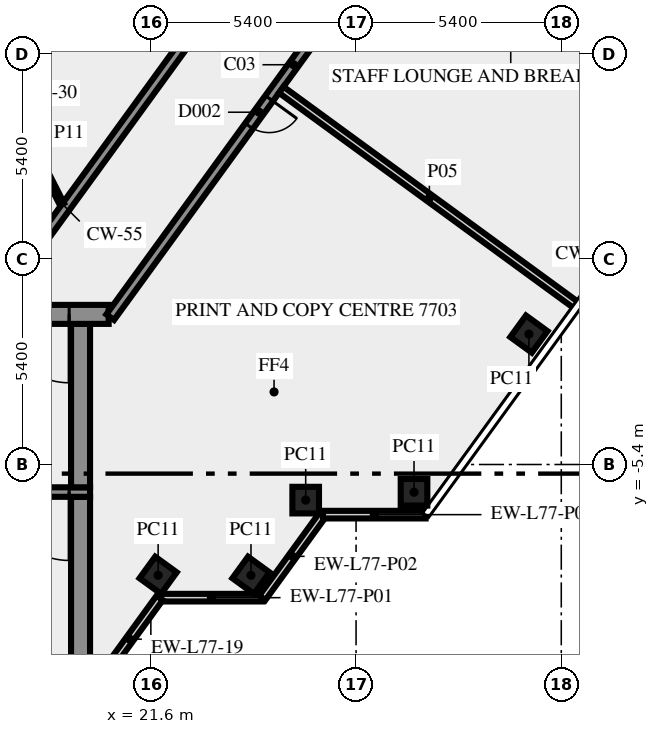
"""IFC4 building model, lengths in metres.
Left out: names, types, materials, properties, quantities, classifications, styles, units other than length and angle.
Written with IfcOpenShell. Run it as: python <this file> out.ifc"""

import sys

from ifc_helpers import new_model, si_unit, direction, frame, frame_2d, origin, origin_2d, place, context, subcontext, project, spatial, rectangle, extrude, element, fill, save


model = new_model("IFC4")
c1 = context("Model", 3, precision=1e-05, world=origin(), true_north=direction((0.0, 1.0)))
c2 = subcontext(c1, "Body", "Model", "MODEL_VIEW")
j1 = project(units=[si_unit("LENGTHUNIT", "METRE"), si_unit("PLANEANGLEUNIT", "RADIAN")], contexts=[c1])
p1 = place(None, origin())
s1 = spatial("IfcSite", under=j1, at=p1, CompositionType="ELEMENT")
p2 = place(p1, origin())
s2 = spatial("IfcBuilding", under=s1, at=p2, CompositionType="ELEMENT")
p3 = place(p2, frame((0.0, 0.0, 331.0)))
s3 = spatial("IfcBuildingStorey", under=s2, at=p3, CompositionType="ELEMENT", Elevation=331.0)
for number, where, z_axis, x_axis in (
    (1, (21.792, -8.315, 0.0), (0.0, 0.0, 1.0), (0.588, 0.809, 0.0)),
    (2, (24.235, -8.315, 0.0), (0.0, 0.0, 1.0), (0.588, 0.809, 0.0)),
    (3, (25.674, -6.337, 0.0), (0.0, 0.0, 1.0), (1.0, 0.0, 0.0)),
    (4, (28.525, -6.13, 0.0), (0.0, 0.0, 1.0), (1.0, 0.0, 0.0)),
    (5, (31.548, -1.969, 0.0), (0.0, 0.0, 1.0), (0.588, 0.809, 0.0)),
):
    element("IfcColumn", number, at=place(p3, frame(where, z_axis=z_axis, x_axis=x_axis)), inside=s3, PredefinedType="COLUMN", context=c2, shape_type="SweptSolid", body=[
        extrude(rectangle(XDim=0.7, YDim=0.7, at=origin_2d()), origin(), (0.0, 0.0, 1.0), 3.65),
    ])
p4 = place(p3, frame((21.843, -8.904, 0.0), z_axis=(0.0, 0.0, 1.0), x_axis=(1.0, 0.0, 0.0)))
e6 = element("IfcWall", 6, at=p4, inside=s3, PredefinedType="SOLIDWALL", context=c2, shape_type="SweptSolid", body=[
    extrude(rectangle(XDim=2.7, YDim=0.2, at=frame_2d((1.35, 0.0))), origin(), (0.0, 0.0, 1.0), 3.65),
])
p5 = place(p3, frame((24.533, -8.909, 0.0), z_axis=(0.0, 0.0, 1.0), x_axis=(0.587720002413, 0.809064397168, 0.0)))
e7 = element("IfcWall", 7, at=p5, inside=s3, PredefinedType="SOLIDWALL", context=c2, shape_type="SweptSolid", body=[
    extrude(rectangle(XDim=2.7, YDim=0.2, at=frame_2d((1.35, 0.0))), origin(), (0.0, 0.0, 1.0), 3.65),
])
p6 = place(p3, frame((26.13, -6.719, 0.0), z_axis=(0.0, 0.0, 1.0), x_axis=(1.0, 0.0, 0.0)))
e8 = element("IfcWall", 8, at=p6, inside=s3, PredefinedType="SOLIDWALL", context=c2, shape_type="SweptSolid", body=[
    extrude(rectangle(XDim=2.7, YDim=0.2, at=frame_2d((1.35, 0.0))), origin(), (0.0, 0.0, 1.0), 3.65),
])
p7 = place(p3, frame((20.253, -11.083, 0.0), z_axis=(0.0, 0.0, 1.0), x_axis=(0.587766567315, 0.809030569476, 0.0)))
e9 = element("IfcWall", 9, at=p7, inside=s3, PredefinedType="SOLIDWALL", context=c2, shape_type="SweptSolid", body=[
    extrude(rectangle(XDim=2.688, YDim=0.2, at=frame_2d((1.344, 0.0))), origin(), (0.0, 0.0, 1.0), 3.65),
])
p8 = place(p3, frame((19.75, -10.5, 0.0), z_axis=(0.0, 0.0, 1.0), x_axis=(0.0, 1.0, 0.0)))
e10 = element("IfcWall", 10, at=p8, inside=s3, PredefinedType="SHEAR", context=c2, shape_type="SweptSolid", body=[
    extrude(rectangle(XDim=4.25, YDim=0.5, at=frame_2d((2.125, 0.0))), origin(), (0.0, 0.0, 1.0), 3.65),
])
p9 = place(p3, frame((20.0, -6.125, 0.0), z_axis=(0.0, 0.0, 1.0), x_axis=(-1.0, 0.0, 0.0)))
e11 = element("IfcWall", 11, at=p9, inside=s3, PredefinedType="SHEAR", context=c2, shape_type="SweptSolid", body=[
    extrude(rectangle(XDim=10.8, YDim=0.25, at=frame_2d((5.4, 0.0))), origin(), (0.0, 0.0, 1.0), 3.65),
])
p10 = place(p9, frame((0.55, 0.0, 0.0)))
e12 = element("IfcOpeningElement", 12, at=p10, cuts=e11, PredefinedType="OPENING", context=c2, shape_type="SweptSolid", body=[
    extrude(rectangle(XDim=1.8, YDim=2.1, at=frame_2d((0.9, 1.05))), frame((0.0, 0.135, 0.0), z_axis=(0.0, -1.0, 0.0), x_axis=(1.0, 0.0, 0.0)), (0.0, 0.0, 1.0), 0.27),
])
p11 = place(p3, frame((19.75, -6.0, 0.0), z_axis=(0.0, 0.0, 1.0), x_axis=(0.0, 1.0, 0.0)))
e13 = element("IfcWall", 13, at=p11, inside=s3, PredefinedType="SHEAR", context=c2, shape_type="SweptSolid", body=[
    extrude(rectangle(XDim=4.3, YDim=0.5, at=frame_2d((2.15, 0.0))), origin(), (0.0, 0.0, 1.0), 3.65),
])
p12 = place(p3, frame((20.49, -1.45, 0.0), z_axis=(0.0, 0.0, 1.0), x_axis=(-1.0, 0.0, 0.0)))
e14 = element("IfcWall", 14, at=p12, inside=s3, PredefinedType="SHEAR", context=c2, shape_type="SweptSolid", body=[
    extrude(rectangle(XDim=40.98, YDim=0.5, at=frame_2d((20.49, 0.0))), origin(), (0.0, 0.0, 1.0), 3.65),
])
p13 = place(p12, frame((38.14, 0.0, 0.0)))
e15 = element("IfcOpeningElement", 15, at=p13, cuts=e14, PredefinedType="OPENING", context=c2, shape_type="SweptSolid", body=[
    extrude(rectangle(XDim=1.8, YDim=2.1, at=frame_2d((0.9, 1.05))), frame((0.0, 0.26, 0.0), z_axis=(0.0, -1.0, 0.0), x_axis=(1.0, 0.0, 0.0)), (0.0, 0.0, 1.0), 0.52),
])
p14 = place(p12, frame((36.728, 0.0, 0.0)))
e16 = element("IfcOpeningElement", 16, at=p14, cuts=e14, PredefinedType="OPENING", context=c2, shape_type="SweptSolid", body=[
    extrude(rectangle(XDim=0.8, YDim=2.1, at=frame_2d((0.4, 1.05))), frame((0.0, 0.26, 0.0), z_axis=(0.0, -1.0, 0.0), x_axis=(1.0, 0.0, 0.0)), (0.0, 0.0, 1.0), 0.52),
])
p15 = place(p12, frame((35.153, 0.0, 0.0)))
e17 = element("IfcOpeningElement", 17, at=p15, cuts=e14, PredefinedType="OPENING", context=c2, shape_type="SweptSolid", body=[
    extrude(rectangle(XDim=0.8, YDim=2.1, at=frame_2d((0.4, 1.05))), frame((0.0, 0.26, 0.0), z_axis=(0.0, -1.0, 0.0), x_axis=(1.0, 0.0, 0.0)), (0.0, 0.0, 1.0), 0.52),
])
p16 = place(p12, frame((32.94, 0.0, 0.0)))
e18 = element("IfcOpeningElement", 18, at=p16, cuts=e14, PredefinedType="OPENING", context=c2, shape_type="SweptSolid", body=[
    extrude(rectangle(XDim=0.9, YDim=2.1, at=frame_2d((0.45, 1.05))), frame((0.0, 0.26, 0.0), z_axis=(0.0, -1.0, 0.0), x_axis=(1.0, 0.0, 0.0)), (0.0, 0.0, 1.0), 0.52),
])
p17 = place(p12, frame((31.015, 0.0, 0.0)))
e19 = element("IfcOpeningElement", 19, at=p17, cuts=e14, PredefinedType="OPENING", context=c2, shape_type="SweptSolid", body=[
    extrude(rectangle(XDim=0.8, YDim=2.1, at=frame_2d((0.4, 1.05))), frame((0.0, 0.26, 0.0), z_axis=(0.0, -1.0, 0.0), x_axis=(1.0, 0.0, 0.0)), (0.0, 0.0, 1.0), 0.52),
])
p18 = place(p12, frame((24.765, 0.0, 0.0)))
e20 = element("IfcOpeningElement", 20, at=p18, cuts=e14, PredefinedType="OPENING", context=c2, shape_type="SweptSolid", body=[
    extrude(rectangle(XDim=0.8, YDim=2.1, at=frame_2d((0.4, 1.05))), frame((0.0, 0.26, 0.0), z_axis=(0.0, -1.0, 0.0), x_axis=(1.0, 0.0, 0.0)), (0.0, 0.0, 1.0), 0.52),
])
p19 = place(p12, frame((19.59, 0.0, 0.0)))
e21 = element("IfcOpeningElement", 21, at=p19, cuts=e14, PredefinedType="OPENING", context=c2, shape_type="SweptSolid", body=[
    extrude(rectangle(XDim=2.0, YDim=2.1, at=frame_2d((1.0, 1.05))), frame((0.0, 0.26, 0.0), z_axis=(0.0, -1.0, 0.0), x_axis=(1.0, 0.0, 0.0)), (0.0, 0.0, 1.0), 0.52),
])
p20 = place(p12, frame((15.103, 0.0, 0.0)))
e22 = element("IfcOpeningElement", 22, at=p20, cuts=e14, PredefinedType="OPENING", context=c2, shape_type="SweptSolid", body=[
    extrude(rectangle(XDim=0.9, YDim=2.1, at=frame_2d((0.45, 1.05))), frame((0.0, 0.26, 0.0), z_axis=(0.0, -1.0, 0.0), x_axis=(1.0, 0.0, 0.0)), (0.0, 0.0, 1.0), 0.52),
])
p21 = place(p12, frame((13.04, 0.0, 0.0)))
e23 = element("IfcOpeningElement", 23, at=p21, cuts=e14, PredefinedType="OPENING", context=c2, shape_type="SweptSolid", body=[
    extrude(rectangle(XDim=0.9, YDim=2.1, at=frame_2d((0.45, 1.05))), frame((0.0, 0.26, 0.0), z_axis=(0.0, -1.0, 0.0), x_axis=(1.0, 0.0, 0.0)), (0.0, 0.0, 1.0), 0.52),
])
p22 = place(p12, frame((10.177, 0.0, 0.0)))
e24 = element("IfcOpeningElement", 24, at=p22, cuts=e14, PredefinedType="OPENING", context=c2, shape_type="SweptSolid", body=[
    extrude(rectangle(XDim=0.9, YDim=2.1, at=frame_2d((0.45, 1.05))), frame((0.0, 0.26, 0.0), z_axis=(0.0, -1.0, 0.0), x_axis=(1.0, 0.0, 0.0)), (0.0, 0.0, 1.0), 0.52),
])
p23 = place(p12, frame((7.14, 0.0, 0.0)))
e25 = element("IfcOpeningElement", 25, at=p23, cuts=e14, PredefinedType="OPENING", context=c2, shape_type="SweptSolid", body=[
    extrude(rectangle(XDim=0.9, YDim=2.1, at=frame_2d((0.45, 1.05))), frame((0.0, 0.26, 0.0), z_axis=(0.0, -1.0, 0.0), x_axis=(1.0, 0.0, 0.0)), (0.0, 0.0, 1.0), 0.52),
])
p24 = place(p12, frame((4.19, 0.0, 0.0)))
e26 = element("IfcOpeningElement", 26, at=p24, cuts=e14, PredefinedType="OPENING", context=c2, shape_type="SweptSolid", body=[
    extrude(rectangle(XDim=0.9, YDim=2.1, at=frame_2d((0.45, 1.05))), frame((0.0, 0.26, 0.0), z_axis=(0.0, -1.0, 0.0), x_axis=(1.0, 0.0, 0.0)), (0.0, 0.0, 1.0), 0.52),
])
p25 = place(p12, frame((1.04, 0.0, 0.0)))
e27 = element("IfcOpeningElement", 27, at=p25, cuts=e14, PredefinedType="OPENING", context=c2, shape_type="SweptSolid", body=[
    extrude(rectangle(XDim=1.8, YDim=2.1, at=frame_2d((0.9, 1.05))), frame((0.0, 0.26, 0.0), z_axis=(0.0, -1.0, 0.0), x_axis=(1.0, 0.0, 0.0)), (0.0, 0.0, 1.0), 0.52),
])
p26 = place(p3, frame((17.545, -1.125, 0.0), z_axis=(0.0, 0.0, 1.0), x_axis=(0.58779555165, 0.809009511354, 0.0)))
e28 = element("IfcWall", 28, at=p26, inside=s3, PredefinedType="SOLIDWALL", context=c2, shape_type="SweptSolid", body=[
    extrude(rectangle(XDim=18.103, YDim=0.25, at=frame_2d((9.052, 0.0))), origin(), (0.0, 0.0, 1.0), 3.65),
])
p27 = place(p26, frame((16.728, 0.0, 0.0)))
e29 = element("IfcOpeningElement", 29, at=p27, cuts=e28, PredefinedType="OPENING", context=c2, shape_type="SweptSolid", body=[
    extrude(rectangle(XDim=0.9, YDim=2.1, at=frame_2d((0.45, 1.05))), frame((0.0, 0.135, 0.0), z_axis=(0.0, -1.0, 0.0), x_axis=(1.0, 0.0, 0.0)), (0.0, 0.0, 1.0), 0.27),
])
p28 = place(p3, frame((30.183, 11.761, 0.0), z_axis=(0.0, 0.0, 1.0), x_axis=(-0.587781762867, -0.80901952958, 0.0)))
e30 = element("IfcWall", 30, at=p28, inside=s3, PredefinedType="SOLIDWALL", context=c2, shape_type="SweptSolid", body=[
    extrude(rectangle(XDim=16.42, YDim=0.25, at=frame_2d((8.21, 0.0))), origin(), (0.0, 0.0, 1.0), 3.65),
])
p29 = place(p28, frame((0.225, 0.0, 0.0)))
e31 = element("IfcOpeningElement", 31, at=p29, cuts=e30, PredefinedType="OPENING", context=c2, shape_type="SweptSolid", body=[
    extrude(rectangle(XDim=0.9, YDim=2.1, at=frame_2d((0.45, 1.05))), frame((0.0, 0.135, 0.0), z_axis=(0.0, -1.0, 0.0), x_axis=(1.0, 0.0, 0.0)), (0.0, 0.0, 1.0), 0.27),
])
p30 = place(p28, frame((9.304, 0.0, 0.0)))
e32 = element("IfcOpeningElement", 32, at=p30, cuts=e30, PredefinedType="OPENING", context=c2, shape_type="SweptSolid", body=[
    extrude(rectangle(XDim=0.9, YDim=2.1, at=frame_2d((0.45, 1.05))), frame((0.0, 0.135, 0.0), z_axis=(0.0, -1.0, 0.0), x_axis=(1.0, 0.0, 0.0)), (0.0, 0.0, 1.0), 0.27),
])
p31 = place(p3, frame((25.032, 4.459, 0.0), z_axis=(0.0, 0.0, 1.0), x_axis=(0.807602415854, -0.589727342004, 0.0)))
e33 = element("IfcWall", 33, at=p31, inside=s3, PredefinedType="SOLIDWALL", context=c2, shape_type="SweptSolid", body=[
    extrude(rectangle(XDim=9.651, YDim=0.2, at=frame_2d((4.826, 0.0))), origin(), (0.0, 0.0, 1.0), 2.95),
])
p32 = place(p3, frame((18.0, 3.925, 0.0), z_axis=(0.0, 0.0, 1.0), x_axis=(0.453950796792, -0.891026752736, 0.0)))
e34 = element("IfcWall", 34, at=p32, inside=s3, PredefinedType="PARTITIONING", context=c2, shape_type="SweptSolid", body=[
    extrude(rectangle(XDim=2.778, YDim=0.12, at=frame_2d((1.389, 0.0))), origin(), (0.0, 0.0, 1.0), 3.65),
])
p33 = place(p10, origin())
e35 = element("IfcDoor", 35, at=p33, inside=s3, OperationType="DOUBLE_DOOR_SINGLE_SWING", PredefinedType="DOOR", context=c2, shape_type="SweptSolid", body=[
    extrude(rectangle(XDim=1.8, YDim=2.1, at=frame_2d((0.9, 1.05))), frame((0.0, 0.025, 0.0), z_axis=(0.0, -1.0, 0.0), x_axis=(1.0, 0.0, 0.0)), (0.0, 0.0, 1.0), 0.05),
])
fill(e12, e35)
p34 = place(p25, origin())
e36 = element("IfcDoor", 36, at=p34, inside=s3, OperationType="DOUBLE_DOOR_SINGLE_SWING", PredefinedType="DOOR", context=c2, shape_type="SweptSolid", body=[
    extrude(rectangle(XDim=1.8, YDim=2.1, at=frame_2d((0.9, 1.05))), frame((0.0, 0.025, 0.0), z_axis=(0.0, -1.0, 0.0), x_axis=(1.0, 0.0, 0.0)), (0.0, 0.0, 1.0), 0.05),
])
fill(e27, e36)
p35 = place(p30, origin())
e37 = element("IfcDoor", 37, at=p35, inside=s3, OperationType="SINGLE_SWING_LEFT", PredefinedType="DOOR", context=c2, shape_type="SweptSolid", body=[
    extrude(rectangle(XDim=0.9, YDim=2.1, at=frame_2d((0.45, 1.05))), frame((0.0, 0.025, 0.0), z_axis=(0.0, -1.0, 0.0), x_axis=(1.0, 0.0, 0.0)), (0.0, 0.0, 1.0), 0.05),
])
fill(e32, e37)
save(model, sys.argv[1])
